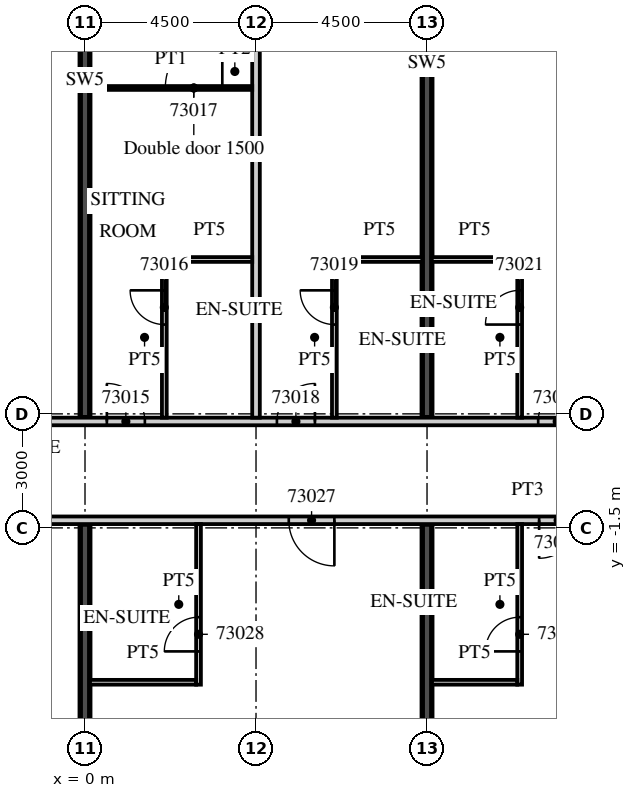
"""IFC4 building model, lengths in metres.
Left out: names, types, materials, properties, quantities, classifications, styles, units other than length and angle.
Written with IfcOpenShell. Run it as: python <this file> out.ifc"""

import sys

from ifc_helpers import new_model, si_unit, direction, frame, frame_2d, origin, place, context, subcontext, project, spatial, rectangle, extrude, element, fill, save


model = new_model("IFC4")
c1 = context("Model", 3, precision=1e-05, world=origin(), true_north=direction((0.0, 1.0)))
c2 = subcontext(c1, "Body", "Model", "MODEL_VIEW")
j1 = project(units=[si_unit("LENGTHUNIT", "METRE"), si_unit("PLANEANGLEUNIT", "RADIAN")], contexts=[c1])
p1 = place(None, origin())
s1 = spatial("IfcSite", under=j1, at=p1, CompositionType="ELEMENT")
p2 = place(p1, origin())
s2 = spatial("IfcBuilding", under=s1, at=p2, CompositionType="ELEMENT")
p3 = place(p2, frame((0.0, 0.0, 291.6)))
s3 = spatial("IfcBuildingStorey", under=s2, at=p3, CompositionType="ELEMENT", Elevation=291.6)
p4 = place(p3, frame((0.0, -20.074, 0.0), z_axis=(0.0, 0.0, 1.0), x_axis=(0.0, 1.0, 0.0)))
e1 = element("IfcWall", 1, at=p4, inside=s3, PredefinedType="SHEAR", context=c2, shape_type="SweptSolid", body=[
    extrude(rectangle(XDim=18.674, YDim=0.25, at=frame_2d((9.337, 0.0))), origin(), (0.0, 0.0, 1.0), 3.3),
])
p5 = place(p3, frame((0.0, 1.4, 0.0), z_axis=(0.0, 0.0, 1.0), x_axis=(0.0, 1.0, 0.0)))
e2 = element("IfcWall", 2, at=p5, inside=s3, PredefinedType="SHEAR", context=c2, shape_type="SweptSolid", body=[
    extrude(rectangle(XDim=17.763, YDim=0.25, at=frame_2d((8.881, 0.0))), origin(), (0.0, 0.0, 1.0), 3.3),
])
p6 = place(p3, frame((9.0, -19.207, 0.0), z_axis=(0.0, 0.0, 1.0), x_axis=(0.0, 1.0, 0.0)))
e3 = element("IfcWall", 3, at=p6, inside=s3, PredefinedType="SHEAR", context=c2, shape_type="SweptSolid", body=[
    extrude(rectangle(XDim=17.807, YDim=0.25, at=frame_2d((8.904, 0.0))), origin(), (0.0, 0.0, 1.0), 3.3),
])
p7 = place(p3, frame((9.0, 1.4, 0.0), z_axis=(0.0, 0.0, 1.0), x_axis=(0.0, 1.0, 0.0)))
e4 = element("IfcWall", 4, at=p7, inside=s3, PredefinedType="SHEAR", context=c2, shape_type="SweptSolid", body=[
    extrude(rectangle(XDim=18.629, YDim=0.25, at=frame_2d((9.315, 0.0))), origin(), (0.0, 0.0, 1.0), 3.3),
])
p8 = place(p3, frame((-39.909, 1.3, 0.0), z_axis=(0.0, 0.0, 1.0), x_axis=(1.0, 0.0, 0.0)))
e5 = element("IfcWall", 5, at=p8, inside=s3, PredefinedType="PARTITIONING", context=c2, shape_type="SweptSolid", body=[
    extrude(rectangle(XDim=53.409, YDim=0.2, at=frame_2d((26.705, 0.0))), origin(), (0.0, 0.0, 1.0), 3.02),
])
p9 = place(p8, frame((0.255, 0.0, 0.0)))
e6 = element("IfcOpeningElement", 6, at=p9, cuts=e5, PredefinedType="OPENING", context=c2, shape_type="SweptSolid", body=[
    extrude(rectangle(XDim=0.9, YDim=2.1, at=frame_2d((0.45, 1.05))), frame((0.0, 0.11, 0.0), z_axis=(0.0, -1.0, 0.0), x_axis=(1.0, 0.0, 0.0)), (0.0, 0.0, 1.0), 0.22),
])
p10 = place(p8, frame((6.347, 0.0, 0.0)))
e7 = element("IfcOpeningElement", 7, at=p10, cuts=e5, PredefinedType="OPENING", context=c2, shape_type="SweptSolid", body=[
    extrude(rectangle(XDim=1.2, YDim=2.1, at=frame_2d((0.6, 1.05))), frame((0.0, 0.11, 0.0), z_axis=(0.0, -1.0, 0.0), x_axis=(1.0, 0.0, 0.0)), (0.0, 0.0, 1.0), 0.22),
])
p11 = place(p8, frame((13.484, 0.0, 0.0)))
e8 = element("IfcOpeningElement", 8, at=p11, cuts=e5, PredefinedType="OPENING", context=c2, shape_type="SweptSolid", body=[
    extrude(rectangle(XDim=1.0, YDim=2.1, at=frame_2d((0.5, 1.05))), frame((0.0, 0.11, 0.0), z_axis=(0.0, -1.0, 0.0), x_axis=(1.0, 0.0, 0.0)), (0.0, 0.0, 1.0), 0.22),
])
p12 = place(p8, frame((20.334, 0.0, 0.0)))
e9 = element("IfcOpeningElement", 9, at=p12, cuts=e5, PredefinedType="OPENING", context=c2, shape_type="SweptSolid", body=[
    extrude(rectangle(XDim=1.0, YDim=2.1, at=frame_2d((0.5, 1.05))), frame((0.0, 0.11, 0.0), z_axis=(0.0, -1.0, 0.0), x_axis=(1.0, 0.0, 0.0)), (0.0, 0.0, 1.0), 0.22),
])
p13 = place(p8, frame((22.484, 0.0, 0.0)))
e10 = element("IfcOpeningElement", 10, at=p13, cuts=e5, PredefinedType="OPENING", context=c2, shape_type="SweptSolid", body=[
    extrude(rectangle(XDim=1.0, YDim=2.1, at=frame_2d((0.5, 1.05))), frame((0.0, 0.11, 0.0), z_axis=(0.0, -1.0, 0.0), x_axis=(1.0, 0.0, 0.0)), (0.0, 0.0, 1.0), 0.22),
])
p14 = place(p8, frame((26.959, 0.0, 0.0)))
e11 = element("IfcOpeningElement", 11, at=p14, cuts=e5, PredefinedType="OPENING", context=c2, shape_type="SweptSolid", body=[
    extrude(rectangle(XDim=1.0, YDim=2.1, at=frame_2d((0.5, 1.05))), frame((0.0, 0.11, 0.0), z_axis=(0.0, -1.0, 0.0), x_axis=(1.0, 0.0, 0.0)), (0.0, 0.0, 1.0), 0.22),
])
p15 = place(p8, frame((36.271, 0.0, 0.0)))
e12 = element("IfcOpeningElement", 12, at=p15, cuts=e5, PredefinedType="OPENING", context=c2, shape_type="SweptSolid", body=[
    extrude(rectangle(XDim=1.2, YDim=2.1, at=frame_2d((0.6, 1.05))), frame((0.0, 0.11, 0.0), z_axis=(0.0, -1.0, 0.0), x_axis=(1.0, 0.0, 0.0)), (0.0, 0.0, 1.0), 0.22),
])
p16 = place(p8, frame((40.484, 0.0, 0.0)))
e13 = element("IfcOpeningElement", 13, at=p16, cuts=e5, PredefinedType="OPENING", context=c2, shape_type="SweptSolid", body=[
    extrude(rectangle(XDim=1.0, YDim=2.1, at=frame_2d((0.5, 1.05))), frame((0.0, 0.11, 0.0), z_axis=(0.0, -1.0, 0.0), x_axis=(1.0, 0.0, 0.0)), (0.0, 0.0, 1.0), 0.22),
])
p17 = place(p8, frame((44.959, 0.0, 0.0)))
e14 = element("IfcOpeningElement", 14, at=p17, cuts=e5, PredefinedType="OPENING", context=c2, shape_type="SweptSolid", body=[
    extrude(rectangle(XDim=1.0, YDim=2.1, at=frame_2d((0.5, 1.05))), frame((0.0, 0.11, 0.0), z_axis=(0.0, -1.0, 0.0), x_axis=(1.0, 0.0, 0.0)), (0.0, 0.0, 1.0), 0.22),
])
p18 = place(p8, frame((51.834, 0.0, 0.0)))
e15 = element("IfcOpeningElement", 15, at=p18, cuts=e5, PredefinedType="OPENING", context=c2, shape_type="SweptSolid", body=[
    extrude(rectangle(XDim=1.0, YDim=2.1, at=frame_2d((0.5, 1.05))), frame((0.0, 0.11, 0.0), z_axis=(0.0, -1.0, 0.0), x_axis=(1.0, 0.0, 0.0)), (0.0, 0.0, 1.0), 0.22),
])
p19 = place(p3, frame((4.5, 1.4, 0.0), z_axis=(0.0, 0.0, 1.0), x_axis=(0.0, 1.0, 0.0)))
e16 = element("IfcWall", 16, at=p19, inside=s3, PredefinedType="PARTITIONING", context=c2, shape_type="SweptSolid", body=[
    extrude(rectangle(XDim=18.218, YDim=0.2, at=frame_2d((9.109, 0.0))), origin(), (0.0, 0.0, 1.0), 3.02),
])
p20 = place(p3, frame((2.087, 1.4, 0.0), z_axis=(0.0, 0.0, 1.0), x_axis=(0.0, 1.0, 0.0)))
e17 = element("IfcWall", 17, at=p20, inside=s3, PredefinedType="PARTITIONING", context=c2, shape_type="SweptSolid", body=[
    extrude(rectangle(XDim=4.225, YDim=0.125, at=frame_2d((2.113, 0.0))), origin(), (0.0, 0.0, 1.0), 3.02),
])
p21 = place(p20, frame((2.45, 0.0, 0.0)))
e18 = element("IfcOpeningElement", 18, at=p21, cuts=e17, PredefinedType="OPENING", context=c2, shape_type="SweptSolid", body=[
    extrude(rectangle(XDim=0.9, YDim=2.1, at=frame_2d((0.45, 1.05))), frame((0.0, 0.073, 0.0), z_axis=(0.0, -1.0, 0.0), x_axis=(1.0, 0.0, 0.0)), (0.0, 0.0, 1.0), 0.145),
])
p22 = place(p3, frame((2.15, 5.562, 0.0), z_axis=(0.0, 0.0, 1.0), x_axis=(1.0, 0.0, 0.0)))
e19 = element("IfcWall", 19, at=p22, inside=s3, PredefinedType="PARTITIONING", context=c2, shape_type="SweptSolid", body=[
    extrude(rectangle(XDim=2.25, YDim=0.125, at=frame_2d((1.125, 0.0))), origin(), (0.0, 0.0, 1.0), 3.02),
])
p23 = place(p3, frame((0.125, 10.075, 0.0), z_axis=(0.0, 0.0, 1.0), x_axis=(1.0, 0.0, 0.0)))
e20 = element("IfcWall", 20, at=p23, inside=s3, PredefinedType="PARTITIONING", context=c2, shape_type="SweptSolid", body=[
    extrude(rectangle(XDim=4.275, YDim=0.1, at=frame_2d((2.137, 0.0))), origin(), (0.0, 0.0, 1.0), 3.02),
])
p24 = place(p23, frame((1.988, 0.0, 0.0)))
e21 = element("IfcOpeningElement", 21, at=p24, cuts=e20, PredefinedType="OPENING", context=c2, shape_type="SweptSolid", body=[
    extrude(rectangle(XDim=1.5, YDim=2.1, at=frame_2d((0.75, 1.05))), frame((0.0, 0.06, 0.0), z_axis=(0.0, -1.0, 0.0), x_axis=(1.0, 0.0, 0.0)), (0.0, 0.0, 1.0), 0.12),
])
p25 = place(p3, frame((6.562, 1.4, 0.0), z_axis=(0.0, 0.0, 1.0), x_axis=(0.0, 1.0, 0.0)))
e22 = element("IfcWall", 22, at=p25, inside=s3, PredefinedType="PARTITIONING", context=c2, shape_type="SweptSolid", body=[
    extrude(rectangle(XDim=4.225, YDim=0.125, at=frame_2d((2.113, 0.0))), origin(), (0.0, 0.0, 1.0), 3.02),
])
p26 = place(p25, frame((2.45, 0.0, 0.0)))
e23 = element("IfcOpeningElement", 23, at=p26, cuts=e22, PredefinedType="OPENING", context=c2, shape_type="SweptSolid", body=[
    extrude(rectangle(XDim=0.9, YDim=2.1, at=frame_2d((0.45, 1.05))), frame((0.0, 0.073, 0.0), z_axis=(0.0, -1.0, 0.0), x_axis=(1.0, 0.0, 0.0)), (0.0, 0.0, 1.0), 0.145),
])
p27 = place(p3, frame((6.625, 5.562, 0.0), z_axis=(0.0, 0.0, 1.0), x_axis=(1.0, 0.0, 0.0)))
e24 = element("IfcWall", 24, at=p27, inside=s3, PredefinedType="PARTITIONING", context=c2, shape_type="SweptSolid", body=[
    extrude(rectangle(XDim=2.25, YDim=0.125, at=frame_2d((1.125, 0.0))), origin(), (0.0, 0.0, 1.0), 3.02),
])
p28 = place(p3, frame((11.438, 1.4, 0.0), z_axis=(0.0, 0.0, 1.0), x_axis=(0.0, 1.0, 0.0)))
e25 = element("IfcWall", 25, at=p28, inside=s3, PredefinedType="PARTITIONING", context=c2, shape_type="SweptSolid", body=[
    extrude(rectangle(XDim=4.225, YDim=0.125, at=frame_2d((2.113, 0.0))), origin(), (0.0, 0.0, 1.0), 3.02),
])
p29 = place(p28, frame((2.45, 0.0, 0.0)))
e26 = element("IfcOpeningElement", 26, at=p29, cuts=e25, PredefinedType="OPENING", context=c2, shape_type="SweptSolid", body=[
    extrude(rectangle(XDim=0.9, YDim=2.1, at=frame_2d((0.45, 1.05))), frame((0.0, 0.073, 0.0), z_axis=(0.0, -1.0, 0.0), x_axis=(1.0, 0.0, 0.0)), (0.0, 0.0, 1.0), 0.145),
])
p30 = place(p3, frame((9.125, 5.562, 0.0), z_axis=(0.0, 0.0, 1.0), x_axis=(1.0, 0.0, 0.0)))
e27 = element("IfcWall", 27, at=p30, inside=s3, PredefinedType="PARTITIONING", context=c2, shape_type="SweptSolid", body=[
    extrude(rectangle(XDim=2.25, YDim=0.125, at=frame_2d((1.125, 0.0))), origin(), (0.0, 0.0, 1.0), 3.02),
])
p31 = place(p3, frame((-13.5, -1.3, 0.0), z_axis=(0.0, 0.0, 1.0), x_axis=(1.0, 0.0, 0.0)))
e28 = element("IfcWall", 28, at=p31, inside=s3, PredefinedType="PARTITIONING", context=c2, shape_type="SweptSolid", body=[
    extrude(rectangle(XDim=50.293, YDim=0.2, at=frame_2d((25.146, 0.0))), origin(), (0.0, 0.0, 1.0), 3.02),
])
p32 = place(p31, frame((0.575, 0.0, 0.0)))
e29 = element("IfcOpeningElement", 29, at=p32, cuts=e28, PredefinedType="OPENING", context=c2, shape_type="SweptSolid", body=[
    extrude(rectangle(XDim=1.0, YDim=2.1, at=frame_2d((0.5, 1.05))), frame((0.0, 0.11, 0.0), z_axis=(0.0, -1.0, 0.0), x_axis=(1.0, 0.0, 0.0)), (0.0, 0.0, 1.0), 0.22),
])
p33 = place(p31, frame((9.863, 0.0, 0.0)))
e30 = element("IfcOpeningElement", 30, at=p33, cuts=e28, PredefinedType="OPENING", context=c2, shape_type="SweptSolid", body=[
    extrude(rectangle(XDim=1.2, YDim=2.1, at=frame_2d((0.6, 1.05))), frame((0.0, 0.11, 0.0), z_axis=(0.0, -1.0, 0.0), x_axis=(1.0, 0.0, 0.0)), (0.0, 0.0, 1.0), 0.22),
])
p34 = place(p31, frame((18.862, 0.0, 0.0)))
e31 = element("IfcOpeningElement", 31, at=p34, cuts=e28, PredefinedType="OPENING", context=c2, shape_type="SweptSolid", body=[
    extrude(rectangle(XDim=1.2, YDim=2.1, at=frame_2d((0.6, 1.05))), frame((0.0, 0.11, 0.0), z_axis=(0.0, -1.0, 0.0), x_axis=(1.0, 0.0, 0.0)), (0.0, 0.0, 1.0), 0.22),
])
p35 = place(p31, frame((25.45, 0.0, 0.0)))
e32 = element("IfcOpeningElement", 32, at=p35, cuts=e28, PredefinedType="OPENING", context=c2, shape_type="SweptSolid", body=[
    extrude(rectangle(XDim=1.0, YDim=2.1, at=frame_2d((0.5, 1.05))), frame((0.0, 0.11, 0.0), z_axis=(0.0, -1.0, 0.0), x_axis=(1.0, 0.0, 0.0)), (0.0, 0.0, 1.0), 0.22),
])
p36 = place(p31, frame((27.55, 0.0, 0.0)))
e33 = element("IfcOpeningElement", 33, at=p36, cuts=e28, PredefinedType="OPENING", context=c2, shape_type="SweptSolid", body=[
    extrude(rectangle(XDim=1.0, YDim=2.1, at=frame_2d((0.5, 1.05))), frame((0.0, 0.11, 0.0), z_axis=(0.0, -1.0, 0.0), x_axis=(1.0, 0.0, 0.0)), (0.0, 0.0, 1.0), 0.22),
])
p37 = place(p31, frame((33.938, 0.0, 0.0)))
e34 = element("IfcOpeningElement", 34, at=p37, cuts=e28, PredefinedType="OPENING", context=c2, shape_type="SweptSolid", body=[
    extrude(rectangle(XDim=1.2, YDim=2.1, at=frame_2d((0.6, 1.05))), frame((0.0, 0.11, 0.0), z_axis=(0.0, -1.0, 0.0), x_axis=(1.0, 0.0, 0.0)), (0.0, 0.0, 1.0), 0.22),
])
p38 = place(p31, frame((42.938, 0.0, 0.0)))
e35 = element("IfcOpeningElement", 35, at=p38, cuts=e28, PredefinedType="OPENING", context=c2, shape_type="SweptSolid", body=[
    extrude(rectangle(XDim=1.2, YDim=2.1, at=frame_2d((0.6, 1.05))), frame((0.0, 0.11, 0.0), z_axis=(0.0, -1.0, 0.0), x_axis=(1.0, 0.0, 0.0)), (0.0, 0.0, 1.0), 0.22),
])
p39 = place(p3, frame((2.987, -5.625, 0.0), z_axis=(0.0, 0.0, 1.0), x_axis=(0.0, 1.0, 0.0)))
e36 = element("IfcWall", 36, at=p39, inside=s3, PredefinedType="PARTITIONING", context=c2, shape_type="SweptSolid", body=[
    extrude(rectangle(XDim=4.225, YDim=0.125, at=frame_2d((2.113, 0.0))), origin(), (0.0, 0.0, 1.0), 3.02),
])
p40 = place(p39, frame((0.875, 0.0, 0.0)))
e37 = element("IfcOpeningElement", 37, at=p40, cuts=e36, PredefinedType="OPENING", context=c2, shape_type="SweptSolid", body=[
    extrude(rectangle(XDim=0.9, YDim=2.1, at=frame_2d((0.45, 1.05))), frame((0.0, 0.073, 0.0), z_axis=(0.0, -1.0, 0.0), x_axis=(1.0, 0.0, 0.0)), (0.0, 0.0, 1.0), 0.145),
])
p41 = place(p3, frame((0.125, -5.562, 0.0), z_axis=(0.0, 0.0, 1.0), x_axis=(1.0, 0.0, 0.0)))
e38 = element("IfcWall", 38, at=p41, inside=s3, PredefinedType="PARTITIONING", context=c2, shape_type="SweptSolid", body=[
    extrude(rectangle(XDim=2.8, YDim=0.125, at=frame_2d((1.4, 0.0))), origin(), (0.0, 0.0, 1.0), 3.02),
])
p42 = place(p3, frame((11.438, -5.625, 0.0), z_axis=(0.0, 0.0, 1.0), x_axis=(0.0, 1.0, 0.0)))
e39 = element("IfcWall", 39, at=p42, inside=s3, PredefinedType="PARTITIONING", context=c2, shape_type="SweptSolid", body=[
    extrude(rectangle(XDim=4.225, YDim=0.125, at=frame_2d((2.113, 0.0))), origin(), (0.0, 0.0, 1.0), 3.02),
])
p43 = place(p42, frame((0.875, 0.0, 0.0)))
e40 = element("IfcOpeningElement", 40, at=p43, cuts=e39, PredefinedType="OPENING", context=c2, shape_type="SweptSolid", body=[
    extrude(rectangle(XDim=0.9, YDim=2.1, at=frame_2d((0.45, 1.05))), frame((0.0, 0.073, 0.0), z_axis=(0.0, -1.0, 0.0), x_axis=(1.0, 0.0, 0.0)), (0.0, 0.0, 1.0), 0.145),
])
p44 = place(p3, frame((9.125, -5.562, 0.0), z_axis=(0.0, 0.0, 1.0), x_axis=(1.0, 0.0, 0.0)))
e41 = element("IfcWall", 41, at=p44, inside=s3, PredefinedType="PARTITIONING", context=c2, shape_type="SweptSolid", body=[
    extrude(rectangle(XDim=2.25, YDim=0.125, at=frame_2d((1.125, 0.0))), origin(), (0.0, 0.0, 1.0), 3.02),
])
p45 = place(p16, origin())
e42 = element("IfcDoor", 42, at=p45, inside=s3, OperationType="SINGLE_SWING_LEFT", PredefinedType="DOOR", context=c2, shape_type="SweptSolid", body=[
    extrude(rectangle(XDim=1.0, YDim=2.1, at=frame_2d((0.5, 1.05))), frame((0.0, 0.025, 0.0), z_axis=(0.0, -1.0, 0.0), x_axis=(1.0, 0.0, 0.0)), (0.0, 0.0, 1.0), 0.05),
])
fill(e13, e42)
p46 = place(p21, origin())
e43 = element("IfcDoor", 43, at=p46, inside=s3, OperationType="SINGLE_SWING_RIGHT", PredefinedType="DOOR", context=c2, shape_type="SweptSolid", body=[
    extrude(rectangle(XDim=0.9, YDim=2.1, at=frame_2d((0.45, 1.05))), frame((0.0, 0.025, 0.0), z_axis=(0.0, -1.0, 0.0), x_axis=(1.0, 0.0, 0.0)), (0.0, 0.0, 1.0), 0.05),
])
fill(e18, e43)
p47 = place(p24, origin())
e44 = element("IfcDoor", 44, at=p47, inside=s3, OperationType="SINGLE_SWING_RIGHT", PredefinedType="DOOR", context=c2, shape_type="SweptSolid", body=[
    extrude(rectangle(XDim=1.5, YDim=2.1, at=frame_2d((0.75, 1.05))), frame((0.0, 0.025, 0.0), z_axis=(0.0, -1.0, 0.0), x_axis=(1.0, 0.0, 0.0)), (0.0, 0.0, 1.0), 0.05),
])
fill(e21, e44)
p48 = place(p17, origin())
e45 = element("IfcDoor", 45, at=p48, inside=s3, OperationType="SINGLE_SWING_RIGHT", PredefinedType="DOOR", context=c2, shape_type="SweptSolid", body=[
    extrude(rectangle(XDim=1.0, YDim=2.1, at=frame_2d((0.5, 1.05))), frame((0.0, 0.025, 0.0), z_axis=(0.0, -1.0, 0.0), x_axis=(1.0, 0.0, 0.0)), (0.0, 0.0, 1.0), 0.05),
])
fill(e14, e45)
p49 = place(p26, origin())
e46 = element("IfcDoor", 46, at=p49, inside=s3, OperationType="SINGLE_SWING_RIGHT", PredefinedType="DOOR", context=c2, shape_type="SweptSolid", body=[
    extrude(rectangle(XDim=0.9, YDim=2.1, at=frame_2d((0.45, 1.05))), frame((0.0, 0.025, 0.0), z_axis=(0.0, -1.0, 0.0), x_axis=(1.0, 0.0, 0.0)), (0.0, 0.0, 1.0), 0.05),
])
fill(e23, e46)
p50 = place(p18, origin())
e47 = element("IfcDoor", 47, at=p50, inside=s3, OperationType="SINGLE_SWING_RIGHT", PredefinedType="DOOR", context=c2, shape_type="SweptSolid", body=[
    extrude(rectangle(XDim=1.0, YDim=2.1, at=frame_2d((0.5, 1.05))), frame((0.0, 0.025, 0.0), z_axis=(0.0, -1.0, 0.0), x_axis=(1.0, 0.0, 0.0)), (0.0, 0.0, 1.0), 0.05),
])
fill(e15, e47)
p51 = place(p29, origin())
e48 = element("IfcDoor", 48, at=p51, inside=s3, OperationType="SINGLE_SWING_LEFT", PredefinedType="DOOR", context=c2, shape_type="SweptSolid", body=[
    extrude(rectangle(XDim=0.9, YDim=2.1, at=frame_2d((0.45, 1.05))), frame((0.0, 0.025, 0.0), z_axis=(0.0, -1.0, 0.0), x_axis=(1.0, 0.0, 0.0)), (0.0, 0.0, 1.0), 0.05),
])
fill(e26, e48)
p52 = place(p34, origin())
e49 = element("IfcDoor", 49, at=p52, inside=s3, OperationType="SINGLE_SWING_RIGHT", PredefinedType="DOOR", context=c2, shape_type="SweptSolid", body=[
    extrude(rectangle(XDim=1.2, YDim=2.1, at=frame_2d((0.6, 1.05))), frame((0.0, 0.025, 0.0), z_axis=(0.0, -1.0, 0.0), x_axis=(1.0, 0.0, 0.0)), (0.0, 0.0, 1.0), 0.05),
])
fill(e31, e49)
p53 = place(p40, origin())
e50 = element("IfcDoor", 50, at=p53, inside=s3, OperationType="SINGLE_SWING_LEFT", PredefinedType="DOOR", context=c2, shape_type="SweptSolid", body=[
    extrude(rectangle(XDim=0.9, YDim=2.1, at=frame_2d((0.45, 1.05))), frame((0.0, 0.025, 0.0), z_axis=(0.0, -1.0, 0.0), x_axis=(1.0, 0.0, 0.0)), (0.0, 0.0, 1.0), 0.05),
])
fill(e37, e50)
p54 = place(p35, origin())
e51 = element("IfcDoor", 51, at=p54, inside=s3, OperationType="SINGLE_SWING_LEFT", PredefinedType="DOOR", context=c2, shape_type="SweptSolid", body=[
    extrude(rectangle(XDim=1.0, YDim=2.1, at=frame_2d((0.5, 1.05))), frame((0.0, 0.025, 0.0), z_axis=(0.0, -1.0, 0.0), x_axis=(1.0, 0.0, 0.0)), (0.0, 0.0, 1.0), 0.05),
])
fill(e32, e51)
p55 = place(p43, origin())
e52 = element("IfcDoor", 52, at=p55, inside=s3, OperationType="SINGLE_SWING_LEFT", PredefinedType="DOOR", context=c2, shape_type="SweptSolid", body=[
    extrude(rectangle(XDim=0.9, YDim=2.1, at=frame_2d((0.45, 1.05))), frame((0.0, 0.025, 0.0), z_axis=(0.0, -1.0, 0.0), x_axis=(1.0, 0.0, 0.0)), (0.0, 0.0, 1.0), 0.05),
])
fill(e40, e52)
save(model, sys.argv[1])
